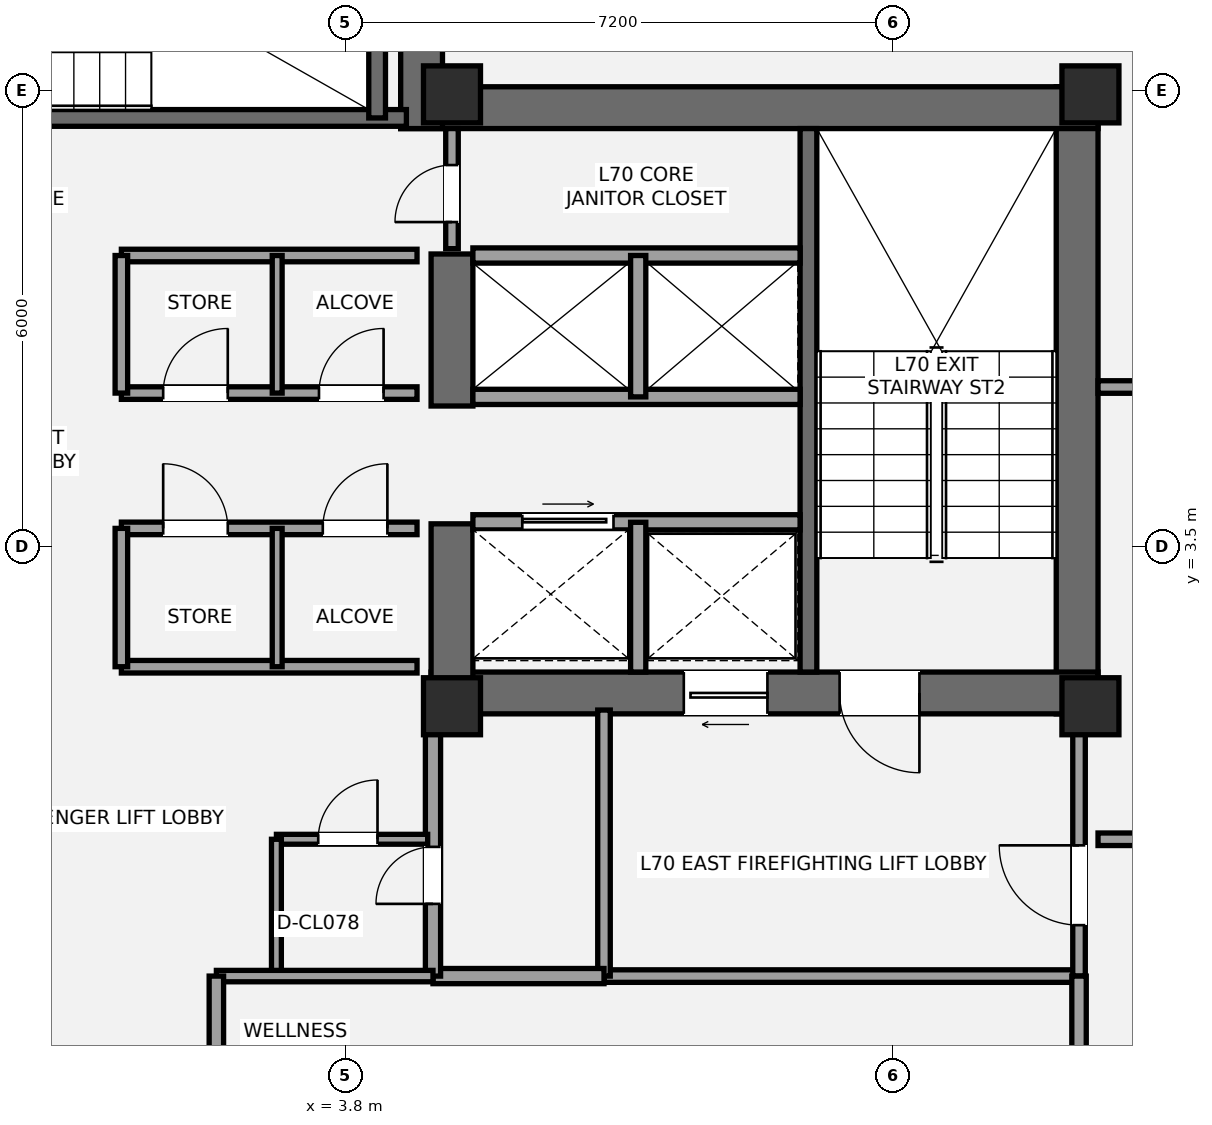
"""IFC4 building model, lengths in metres.
Left out: names, types, materials, properties, quantities, classifications, styles, units other than length and angle.
Written with IfcOpenShell. Run it as: python <this file> out.ifc"""

import sys

from ifc_helpers import new_model, si_unit, direction, frame, frame_2d, origin, origin_2d, place, context, subcontext, project, spatial, rectangle, extrude, element, fill, save


model = new_model("IFC4")
c1 = context("Model", 3, precision=1e-05, world=origin(), true_north=direction((0.0, 1.0)))
c2 = subcontext(c1, "Body", "Model", "MODEL_VIEW")
j1 = project(units=[si_unit("LENGTHUNIT", "METRE"), si_unit("PLANEANGLEUNIT", "RADIAN")], contexts=[c1])
p1 = place(None, origin())
s1 = spatial("IfcSite", under=j1, at=p1, CompositionType="ELEMENT")
p2 = place(p1, origin())
s2 = spatial("IfcBuilding", under=s1, at=p2, CompositionType="ELEMENT")
p3 = place(p2, frame((0.0, 0.0, 247.8)))
s3 = spatial("IfcBuildingStorey", under=s2, at=p3, CompositionType="ELEMENT", Elevation=247.8)
p4 = place(p3, frame((13.425, 1.3, 0.0), z_axis=(0.0, 0.0, 1.0), x_axis=(0.0, 1.0, 0.0)))
e1 = element("IfcWall", 1, at=p4, inside=s3, PredefinedType="SHEAR", context=c2, shape_type="SweptSolid", body=[
    extrude(rectangle(XDim=8.25, YDim=0.55, at=frame_2d((4.125, 0.0))), origin(), (0.0, 0.0, 1.0), 3.15),
])
p5 = place(p3, frame((4.525, 9.275, 0.0), z_axis=(0.0, 0.0, 1.0), x_axis=(1.0, 0.0, 0.0)))
e2 = element("IfcWall", 2, at=p5, inside=s3, PredefinedType="SHEAR", context=c2, shape_type="SweptSolid", body=[
    extrude(rectangle(XDim=9.175, YDim=0.55, at=frame_2d((4.587, 0.0))), origin(), (0.0, 0.0, 1.0), 3.15),
])
p6 = place(p3, frame((13.7, 1.575, 0.0), z_axis=(0.0, 0.0, 1.0), x_axis=(-1.0, 0.0, 0.0)))
e3 = element("IfcWall", 3, at=p6, inside=s3, PredefinedType="SHEAR", context=c2, shape_type="SweptSolid", body=[
    extrude(rectangle(XDim=8.775, YDim=0.55, at=frame_2d((4.387, 0.0))), origin(), (0.0, 0.0, 1.0), 3.15),
])
p7 = place(p6, frame((2.35, 0.0, 0.0)))
e4 = element("IfcOpeningElement", 4, at=p7, cuts=e3, PredefinedType="OPENING", context=c2, shape_type="SweptSolid", body=[
    extrude(rectangle(XDim=1.05, YDim=2.15, at=frame_2d((0.525, 1.075))), frame((0.0, 0.285, 0.0), z_axis=(0.0, -1.0, 0.0), x_axis=(1.0, 0.0, 0.0)), (0.0, 0.0, 1.0), 0.57),
])
p8 = place(p6, frame((4.35, 0.0, 0.0)))
e5 = element("IfcOpeningElement", 5, at=p8, cuts=e3, PredefinedType="OPENING", context=c2, shape_type="SweptSolid", body=[
    extrude(rectangle(XDim=1.1, YDim=2.2, at=frame_2d((0.55, 1.1))), frame((0.0, 0.285, 0.0), z_axis=(0.0, -1.0, 0.0), x_axis=(1.0, 0.0, 0.0)), (0.0, 0.0, 1.0), 0.57),
])
p9 = place(p3, frame((5.2, 1.3, 0.0), z_axis=(0.0, 0.0, 1.0), x_axis=(0.0, 1.0, 0.0)))
e6 = element("IfcWall", 6, at=p9, inside=s3, PredefinedType="SHEAR", context=c2, shape_type="SweptSolid", body=[
    extrude(rectangle(XDim=2.5, YDim=0.55, at=frame_2d((1.25, 0.0))), origin(), (0.0, 0.0, 1.0), 3.15),
])
p10 = place(p3, frame((5.2, 5.35, 0.0), z_axis=(0.0, 0.0, 1.0), x_axis=(0.0, 1.0, 0.0)))
e7 = element("IfcWall", 7, at=p10, inside=s3, PredefinedType="SHEAR", context=c2, shape_type="SweptSolid", body=[
    extrude(rectangle(XDim=2.0, YDim=0.55, at=frame_2d((1.0, 0.0))), origin(), (0.0, 0.0, 1.0), 3.15),
])
p11 = place(p3, frame((9.89, 1.85, 0.0), z_axis=(0.0, 0.0, 1.0), x_axis=(0.0, 1.0, 0.0)))
e8 = element("IfcWall", 8, at=p11, inside=s3, PredefinedType="SHEAR", context=c2, shape_type="SweptSolid", body=[
    extrude(rectangle(XDim=7.15, YDim=0.22, at=frame_2d((3.575, 0.0))), origin(), (0.0, 0.0, 1.0), 3.15),
])
p12 = place(p3, frame((4.8, 9.0, 0.0), z_axis=(0.0, 0.0, 1.0), x_axis=(0.0, 1.0, 0.0)))
e9 = element("IfcWall", 9, at=p12, inside=s3, PredefinedType="SHEAR", context=c2, shape_type="SweptSolid", body=[
    extrude(rectangle(XDim=3.95, YDim=0.55, at=frame_2d((1.975, 0.0))), origin(), (0.0, 0.0, 1.0), 3.15),
])
p13 = place(p3, frame((-4.7, 9.14, 0.0), z_axis=(0.0, 0.0, 1.0), x_axis=(1.0, 0.0, 0.0)))
e10 = element("IfcWall", 10, at=p13, inside=s3, PredefinedType="SHEAR", context=c2, shape_type="SweptSolid", body=[
    extrude(rectangle(XDim=9.3, YDim=0.22, at=frame_2d((4.65, 0.0))), origin(), (0.0, 0.0, 1.0), 3.15),
])
p14 = place(p13, frame((1.15, 0.0, 0.0)))
e11 = element("IfcOpeningElement", 11, at=p14, cuts=e10, PredefinedType="OPENING", context=c2, shape_type="SweptSolid", body=[
    extrude(rectangle(XDim=1.05, YDim=2.15, at=frame_2d((0.525, 1.075))), frame((0.0, 0.12, 0.0), z_axis=(0.0, -1.0, 0.0), x_axis=(1.0, 0.0, 0.0)), (0.0, 0.0, 1.0), 0.24),
])
p15 = place(p3, frame((4.215, 9.14, 0.0), z_axis=(0.0, 0.0, 1.0), x_axis=(0.0, 1.0, 0.0)))
e12 = element("IfcWall", 12, at=p15, inside=s3, PredefinedType="SHEAR", context=c2, shape_type="SweptSolid", body=[
    extrude(rectangle(XDim=3.26, YDim=0.22, at=frame_2d((1.63, 0.0))), origin(), (0.0, 0.0, 1.0), 3.15),
])
for number, where, z_axis, x_axis in (
    (13, (5.2, 1.4, 0.0), (0.0, 0.0, 1.0), (1.0, 0.0, 0.0)),
    (14, (5.2, 9.45, 0.0), (0.0, 0.0, 1.0), (1.0, 0.0, 0.0)),
    (15, (13.6, 1.4, 0.0), (0.0, 0.0, 1.0), (1.0, 0.0, 0.0)),
    (16, (13.6, 9.45, 0.0), (0.0, 0.0, 1.0), (1.0, 0.0, 0.0)),
):
    element("IfcColumn", number, at=place(p3, frame(where, z_axis=z_axis, x_axis=x_axis)), inside=s3, PredefinedType="PILASTER", context=c2, shape_type="SweptSolid", body=[
        extrude(rectangle(XDim=0.75, YDim=0.75, at=origin_2d()), origin(), (0.0, 0.0, 1.0), 3.15),
    ])
p16 = place(p3, frame((7.2, -2.15, 0.0), z_axis=(0.0, 0.0, 1.0), x_axis=(1.0, 0.0, 0.0)))
e17 = element("IfcWall", 17, at=p16, inside=s3, PredefinedType="PARTITIONING", context=c2, shape_type="SweptSolid", body=[
    extrude(rectangle(XDim=6.25, YDim=0.165, at=frame_2d((3.125, 0.0))), origin(), (0.0, 0.0, 1.0), 2.97),
])
p17 = place(p3, frame((7.2, -2.15, 0.0), z_axis=(0.0, 0.0, 1.0), x_axis=(0.0, 1.0, 0.0)))
e18 = element("IfcWall", 18, at=p17, inside=s3, PredefinedType="PARTITIONING", context=c2, shape_type="SweptSolid", body=[
    extrude(rectangle(XDim=3.5, YDim=0.165, at=frame_2d((1.75, 0.0))), origin(), (0.0, 0.0, 1.0), 2.423),
])
p18 = place(p3, frame((13.45, -2.15, 0.0), z_axis=(0.0, 0.0, 1.0), x_axis=(0.0, 1.0, 0.0)))
e19 = element("IfcWall", 19, at=p18, inside=s3, PredefinedType="PARTITIONING", context=c2, shape_type="SweptSolid", body=[
    extrude(rectangle(XDim=3.5, YDim=0.165, at=frame_2d((1.75, 0.0))), origin(), (0.0, 0.0, 1.0), 2.423),
])
p19 = place(p18, frame((0.67, 0.0, 0.0)))
e20 = element("IfcOpeningElement", 20, at=p19, cuts=e19, PredefinedType="OPENING", context=c2, shape_type="SweptSolid", body=[
    extrude(rectangle(XDim=1.05, YDim=2.15, at=frame_2d((0.525, 1.075))), frame((0.0, 0.093, 0.0), z_axis=(0.0, -1.0, 0.0), x_axis=(1.0, 0.0, 0.0)), (0.0, 0.0, 1.0), 0.185),
])
p20 = place(p3, frame((4.95, -2.15, 0.0), z_axis=(0.0, 0.0, 1.0), x_axis=(1.0, 0.0, 0.0)))
e21 = element("IfcWall", 21, at=p20, inside=s3, PredefinedType="SOLIDWALL", context=c2, shape_type="SweptSolid", body=[
    extrude(rectangle(XDim=2.25, YDim=0.2, at=frame_2d((1.125, 0.0))), origin(), (0.0, 0.0, 1.0), 2.97),
])
p21 = place(p3, frame((4.95, -2.15, 0.0), z_axis=(0.0, 0.0, 1.0), x_axis=(0.0, 1.0, 0.0)))
e22 = element("IfcWall", 22, at=p21, inside=s3, PredefinedType="SOLIDWALL", context=c2, shape_type="SweptSolid", body=[
    extrude(rectangle(XDim=3.5, YDim=0.2, at=frame_2d((1.75, 0.0))), origin(), (0.0, 0.0, 1.0), 2.423),
])
p22 = place(p21, frame((0.95, 0.0, 0.0)))
e23 = element("IfcOpeningElement", 23, at=p22, cuts=e22, PredefinedType="OPENING", context=c2, shape_type="SweptSolid", body=[
    extrude(rectangle(XDim=0.75, YDim=2.1, at=frame_2d((0.375, 1.05))), frame((0.0, 0.11, 0.0), z_axis=(0.0, -1.0, 0.0), x_axis=(1.0, 0.0, 0.0)), (0.0, 0.0, 1.0), 0.22),
])
p23 = place(p3, frame((2.89, -0.35, 0.0), z_axis=(0.0, 0.0, 1.0), x_axis=(1.0, 0.0, 0.0)))
e24 = element("IfcWall", 24, at=p23, inside=s3, PredefinedType="PARTITIONING", context=c2, shape_type="SweptSolid", body=[
    extrude(rectangle(XDim=1.99, YDim=0.13, at=frame_2d((0.995, 0.0))), origin(), (0.0, 0.0, 1.0), 2.97),
])
p24 = place(p23, frame((0.55, 0.0, 0.0)))
e25 = element("IfcOpeningElement", 25, at=p24, cuts=e24, PredefinedType="OPENING", context=c2, shape_type="SweptSolid", body=[
    extrude(rectangle(XDim=0.78, YDim=2.1, at=frame_2d((0.39, 1.05))), frame((0.0, 0.075, 0.0), z_axis=(0.0, -1.0, 0.0), x_axis=(1.0, 0.0, 0.0)), (0.0, 0.0, 1.0), 0.15),
])
p25 = place(p3, frame((2.89, -2.15, 0.0), z_axis=(0.0, 0.0, 1.0), x_axis=(0.0, 1.0, 0.0)))
e26 = element("IfcWall", 26, at=p25, inside=s3, PredefinedType="PARTITIONING", context=c2, shape_type="SweptSolid", body=[
    extrude(rectangle(XDim=1.8, YDim=0.13, at=frame_2d((0.9, 0.0))), origin(), (0.0, 0.0, 1.0), 2.97),
])
p26 = place(p3, frame((5.475, 3.82, 0.0), z_axis=(0.0, 0.0, 1.0), x_axis=(1.0, 0.0, 0.0)))
e27 = element("IfcWall", 27, at=p26, inside=s3, PredefinedType="SOLIDWALL", context=c2, shape_type="SweptSolid", body=[
    extrude(rectangle(XDim=4.305, YDim=0.2, at=frame_2d((2.152, 0.0))), origin(), (0.0, 0.0, 1.0), 2.97),
])
p27 = place(p26, frame((0.65, 0.0, 0.0)))
e28 = element("IfcOpeningElement", 28, at=p27, cuts=e27, PredefinedType="OPENING", context=c2, shape_type="SweptSolid", body=[
    extrude(rectangle(XDim=1.2, YDim=2.2, at=frame_2d((0.6, 1.1))), frame((0.0, 0.11, 0.0), z_axis=(0.0, -1.0, 0.0), x_axis=(1.0, 0.0, 0.0)), (0.0, 0.0, 1.0), 0.22),
])
p28 = place(p3, frame((7.65, 1.85, 0.0), z_axis=(0.0, 0.0, 1.0), x_axis=(0.0, 1.0, 0.0)))
e29 = element("IfcWall", 29, at=p28, inside=s3, PredefinedType="SOLIDWALL", context=c2, shape_type="SweptSolid", body=[
    extrude(rectangle(XDim=1.97, YDim=0.2, at=frame_2d((0.985, 0.0))), origin(), (0.0, 0.0, 1.0), 2.97),
])
for number, where, z_axis, x_axis in (
    (30, (5.475, 5.47, 0.0), (0.0, 0.0, 1.0), (1.0, 0.0, 0.0)),
    (31, (5.475, 7.33, 0.0), (0.0, 0.0, 1.0), (1.0, 0.0, 0.0)),
):
    element("IfcWall", number, at=place(p3, frame(where, z_axis=z_axis, x_axis=x_axis)), inside=s3, PredefinedType="SOLIDWALL", context=c2, shape_type="SweptSolid", body=[
        extrude(rectangle(XDim=4.305, YDim=0.2, at=frame_2d((2.152, 0.0))), origin(), (0.0, 0.0, 1.0), 2.97),
    ])
p29 = place(p3, frame((7.65, 5.47, 0.0), z_axis=(0.0, 0.0, 1.0), x_axis=(0.0, 1.0, 0.0)))
e32 = element("IfcWall", 32, at=p29, inside=s3, PredefinedType="SOLIDWALL", context=c2, shape_type="SweptSolid", body=[
    extrude(rectangle(XDim=1.86, YDim=0.2, at=frame_2d((0.93, 0.0))), origin(), (0.0, 0.0, 1.0), 2.97),
])
p30 = place(p3, frame((0.85, 1.92, 0.0), z_axis=(0.0, 0.0, 1.0), x_axis=(1.0, 0.0, 0.0)))
e33 = element("IfcWall", 33, at=p30, inside=s3, PredefinedType="PARTITIONING", context=c2, shape_type="SweptSolid", body=[
    extrude(rectangle(XDim=3.89, YDim=0.165, at=frame_2d((1.945, 0.0))), origin(), (0.0, 0.0, 1.0), 2.11),
])
p31 = place(p3, frame((0.85, 3.74, 0.0), z_axis=(0.0, 0.0, 1.0), x_axis=(1.0, 0.0, 0.0)))
e34 = element("IfcWall", 34, at=p31, inside=s3, PredefinedType="PARTITIONING", context=c2, shape_type="SweptSolid", body=[
    extrude(rectangle(XDim=3.89, YDim=0.165, at=frame_2d((1.945, 0.0))), origin(), (0.0, 0.0, 1.0), 2.97),
])
p32 = place(p31, frame((0.55, 0.0, 0.0)))
e35 = element("IfcOpeningElement", 35, at=p32, cuts=e34, PredefinedType="OPENING", context=c2, shape_type="SweptSolid", body=[
    extrude(rectangle(XDim=0.85, YDim=2.1, at=frame_2d((0.425, 1.05))), frame((0.0, 0.093, 0.0), z_axis=(0.0, -1.0, 0.0), x_axis=(1.0, 0.0, 0.0)), (0.0, 0.0, 1.0), 0.185),
])
p33 = place(p31, frame((2.65, 0.0, 0.0)))
e36 = element("IfcOpeningElement", 36, at=p33, cuts=e34, PredefinedType="OPENING", context=c2, shape_type="SweptSolid", body=[
    extrude(rectangle(XDim=0.85, YDim=2.1, at=frame_2d((0.425, 1.05))), frame((0.0, 0.093, 0.0), z_axis=(0.0, -1.0, 0.0), x_axis=(1.0, 0.0, 0.0)), (0.0, 0.0, 1.0), 0.185),
])
p34 = place(p3, frame((0.85, 1.92, 0.0), z_axis=(0.0, 0.0, 1.0), x_axis=(0.0, 1.0, 0.0)))
e37 = element("IfcWall", 37, at=p34, inside=s3, PredefinedType="PARTITIONING", context=c2, shape_type="SweptSolid", body=[
    extrude(rectangle(XDim=1.82, YDim=0.165, at=frame_2d((0.91, 0.0))), origin(), (0.0, 0.0, 1.0), 2.97),
])
p35 = place(p3, frame((2.9, 1.92, 0.0), z_axis=(0.0, 0.0, 1.0), x_axis=(0.0, 1.0, 0.0)))
e38 = element("IfcWall", 38, at=p35, inside=s3, PredefinedType="PARTITIONING", context=c2, shape_type="SweptSolid", body=[
    extrude(rectangle(XDim=1.82, YDim=0.13, at=frame_2d((0.91, 0.0))), origin(), (0.0, 0.0, 1.0), 2.97),
])
p36 = place(p3, frame((0.85, 5.52, 0.0), z_axis=(0.0, 0.0, 1.0), x_axis=(1.0, 0.0, 0.0)))
e39 = element("IfcWall", 39, at=p36, inside=s3, PredefinedType="PARTITIONING", context=c2, shape_type="SweptSolid", body=[
    extrude(rectangle(XDim=3.89, YDim=0.165, at=frame_2d((1.945, 0.0))), origin(), (0.0, 0.0, 1.0), 2.97),
])
p37 = place(p36, frame((0.55, 0.0, 0.0)))
e40 = element("IfcOpeningElement", 40, at=p37, cuts=e39, PredefinedType="OPENING", context=c2, shape_type="SweptSolid", body=[
    extrude(rectangle(XDim=0.85, YDim=2.1, at=frame_2d((0.425, 1.05))), frame((0.0, 0.093, 0.0), z_axis=(0.0, -1.0, 0.0), x_axis=(1.0, 0.0, 0.0)), (0.0, 0.0, 1.0), 0.185),
])
p38 = place(p36, frame((2.6, 0.0, 0.0)))
e41 = element("IfcOpeningElement", 41, at=p38, cuts=e39, PredefinedType="OPENING", context=c2, shape_type="SweptSolid", body=[
    extrude(rectangle(XDim=0.85, YDim=2.1, at=frame_2d((0.425, 1.05))), frame((0.0, 0.093, 0.0), z_axis=(0.0, -1.0, 0.0), x_axis=(1.0, 0.0, 0.0)), (0.0, 0.0, 1.0), 0.185),
])
p39 = place(p3, frame((0.85, 7.33, 0.0), z_axis=(0.0, 0.0, 1.0), x_axis=(1.0, 0.0, 0.0)))
e42 = element("IfcWall", 42, at=p39, inside=s3, PredefinedType="PARTITIONING", context=c2, shape_type="SweptSolid", body=[
    extrude(rectangle(XDim=3.89, YDim=0.165, at=frame_2d((1.945, 0.0))), origin(), (0.0, 0.0, 1.0), 2.97),
])
p40 = place(p3, frame((0.85, 5.52, 0.0), z_axis=(0.0, 0.0, 1.0), x_axis=(0.0, 1.0, 0.0)))
e43 = element("IfcWall", 43, at=p40, inside=s3, PredefinedType="PARTITIONING", context=c2, shape_type="SweptSolid", body=[
    extrude(rectangle(XDim=1.81, YDim=0.165, at=frame_2d((0.905, 0.0))), origin(), (0.0, 0.0, 1.0), 2.97),
])
p41 = place(p3, frame((2.9, 5.52, 0.0), z_axis=(0.0, 0.0, 1.0), x_axis=(0.0, 1.0, 0.0)))
e44 = element("IfcWall", 44, at=p41, inside=s3, PredefinedType="PARTITIONING", context=c2, shape_type="SweptSolid", body=[
    extrude(rectangle(XDim=1.81, YDim=0.13, at=frame_2d((0.905, 0.0))), origin(), (0.0, 0.0, 1.0), 2.97),
])
p42 = place(p3, frame((5.2, 7.42, 0.0), z_axis=(0.0, 0.0, 1.0), x_axis=(0.0, 1.0, 0.0)))
e45 = element("IfcWall", 45, at=p42, inside=s3, PredefinedType="PARTITIONING", context=c2, shape_type="SweptSolid", body=[
    extrude(rectangle(XDim=1.58, YDim=0.165, at=frame_2d((0.79, 0.0))), origin(), (0.0, 0.0, 1.0), 2.97),
])
p43 = place(p42, frame((0.35, 0.0, 0.0)))
e46 = element("IfcOpeningElement", 46, at=p43, cuts=e45, PredefinedType="OPENING", context=c2, shape_type="SweptSolid", body=[
    extrude(rectangle(XDim=0.75, YDim=2.1, at=frame_2d((0.375, 1.05))), frame((0.0, 0.093, 0.0), z_axis=(0.0, -1.0, 0.0), x_axis=(1.0, 0.0, 0.0)), (0.0, 0.0, 1.0), 0.185),
])
p44 = place(p3, frame((2.1, -2.15, 0.0), z_axis=(0.0, 0.0, 1.0), x_axis=(1.0, 0.0, 0.0)))
e47 = element("IfcWall", 47, at=p44, inside=s3, PredefinedType="PLUMBINGWALL", context=c2, shape_type="SweptSolid", body=[
    extrude(rectangle(XDim=2.85, YDim=0.15, at=frame_2d((1.425, 0.0))), origin(), (0.0, 0.0, 1.0), 2.97),
])
p45 = place(p3, frame((2.1, -4.05, 0.0), z_axis=(0.0, 0.0, 1.0), x_axis=(0.0, 1.0, 0.0)))
e48 = element("IfcWall", 48, at=p45, inside=s3, PredefinedType="PLUMBINGWALL", context=c2, shape_type="SweptSolid", body=[
    extrude(rectangle(XDim=1.9, YDim=0.19, at=frame_2d((0.95, 0.0))), origin(), (0.0, 0.0, 1.0), 2.97),
])
p46 = place(p3, frame((13.45, -4.05, 0.0), z_axis=(0.0, 0.0, 1.0), x_axis=(0.0, 1.0, 0.0)))
e49 = element("IfcWall", 49, at=p46, inside=s3, PredefinedType="PLUMBINGWALL", context=c2, shape_type="SweptSolid", body=[
    extrude(rectangle(XDim=1.9, YDim=0.19, at=frame_2d((0.95, 0.0))), origin(), (0.0, 0.0, 1.0), 2.423),
])
p47 = place(p3, frame((13.7, -0.35, 0.0), z_axis=(0.0, 0.0, 1.0), x_axis=(1.0, 0.0, 0.0)))
e50 = element("IfcWall", 50, at=p47, inside=s3, PredefinedType="PARTITIONING", context=c2, shape_type="SweptSolid", body=[
    extrude(rectangle(XDim=2.5, YDim=0.165, at=frame_2d((1.25, 0.0))), origin(), (0.0, 0.0, 1.0), 2.423),
])
p48 = place(p3, frame((13.7, 5.6, 0.0), z_axis=(0.0, 0.0, 1.0), x_axis=(1.0, 0.0, 0.0)))
e51 = element("IfcWall", 51, at=p48, inside=s3, PredefinedType="PARTITIONING", context=c2, shape_type="SweptSolid", body=[
    extrude(rectangle(XDim=6.115, YDim=0.165, at=frame_2d((3.058, 0.0))), origin(), (0.0, 0.0, 1.0), 2.423),
])
p49 = place(p48, frame((2.961, 0.0, 0.0)))
e52 = element("IfcOpeningElement", 52, at=p49, cuts=e51, PredefinedType="OPENING", context=c2, shape_type="SweptSolid", body=[
    extrude(rectangle(XDim=0.9, YDim=2.1, at=frame_2d((0.45, 1.05))), frame((0.0, 0.093, 0.0), z_axis=(0.0, -1.0, 0.0), x_axis=(1.0, 0.0, 0.0)), (0.0, 0.0, 1.0), 0.185),
])
p50 = place(p7, origin())
e53 = element("IfcDoor", 53, at=p50, inside=s3, OperationType="SINGLE_SWING_LEFT", PredefinedType="DOOR", context=c2, shape_type="SweptSolid", body=[
    extrude(rectangle(XDim=1.05, YDim=2.15, at=frame_2d((0.525, 1.075))), frame((0.0, 0.025, 0.0), z_axis=(0.0, -1.0, 0.0), x_axis=(1.0, 0.0, 0.0)), (0.0, 0.0, 1.0), 0.05),
])
fill(e4, e53)
p51 = place(p19, origin())
e54 = element("IfcDoor", 54, at=p51, inside=s3, OperationType="SINGLE_SWING_RIGHT", PredefinedType="DOOR", context=c2, shape_type="SweptSolid", body=[
    extrude(rectangle(XDim=1.05, YDim=2.15, at=frame_2d((0.525, 1.075))), frame((0.0, 0.025, 0.0), z_axis=(0.0, -1.0, 0.0), x_axis=(1.0, 0.0, 0.0)), (0.0, 0.0, 1.0), 0.05),
])
fill(e20, e54)
p52 = place(p22, origin())
e55 = element("IfcDoor", 55, at=p52, inside=s3, OperationType="SINGLE_SWING_LEFT", PredefinedType="DOOR", context=c2, shape_type="SweptSolid", body=[
    extrude(rectangle(XDim=0.75, YDim=2.1, at=frame_2d((0.375, 1.05))), frame((0.0, 0.025, 0.0), z_axis=(0.0, -1.0, 0.0), x_axis=(1.0, 0.0, 0.0)), (0.0, 0.0, 1.0), 0.05),
])
fill(e23, e55)
p53 = place(p24, origin())
e56 = element("IfcDoor", 56, at=p53, inside=s3, OperationType="SINGLE_SWING_RIGHT", PredefinedType="DOOR", context=c2, shape_type="SweptSolid", body=[
    extrude(rectangle(XDim=0.78, YDim=2.1, at=frame_2d((0.39, 1.05))), frame((0.0, 0.025, 0.0), z_axis=(0.0, -1.0, 0.0), x_axis=(1.0, 0.0, 0.0)), (0.0, 0.0, 1.0), 0.05),
])
fill(e25, e56)
p54 = place(p8, origin())
e57 = element("IfcDoor", 57, at=p54, inside=s3, OperationType="SLIDING_TO_LEFT", PredefinedType="DOOR", context=c2, shape_type="SweptSolid", body=[
    extrude(rectangle(XDim=1.1, YDim=2.2, at=frame_2d((0.55, 1.1))), frame((0.0, 0.025, 0.0), z_axis=(0.0, -1.0, 0.0), x_axis=(1.0, 0.0, 0.0)), (0.0, 0.0, 1.0), 0.05),
])
fill(e5, e57)
p55 = place(p27, origin())
e58 = element("IfcDoor", 58, at=p55, inside=s3, OperationType="SLIDING_TO_RIGHT", PredefinedType="DOOR", context=c2, shape_type="SweptSolid", body=[
    extrude(rectangle(XDim=1.2, YDim=2.2, at=frame_2d((0.6, 1.1))), frame((0.0, 0.025, 0.0), z_axis=(0.0, -1.0, 0.0), x_axis=(1.0, 0.0, 0.0)), (0.0, 0.0, 1.0), 0.05),
])
fill(e28, e58)
p56 = place(p32, origin())
e59 = element("IfcDoor", 59, at=p56, inside=s3, OperationType="SINGLE_SWING_LEFT", PredefinedType="DOOR", context=c2, shape_type="SweptSolid", body=[
    extrude(rectangle(XDim=0.85, YDim=2.1, at=frame_2d((0.425, 1.05))), frame((0.0, 0.025, 0.0), z_axis=(0.0, -1.0, 0.0), x_axis=(1.0, 0.0, 0.0)), (0.0, 0.0, 1.0), 0.05),
])
fill(e35, e59)
p57 = place(p33, origin())
e60 = element("IfcDoor", 60, at=p57, inside=s3, OperationType="SINGLE_SWING_RIGHT", PredefinedType="DOOR", context=c2, shape_type="SweptSolid", body=[
    extrude(rectangle(XDim=0.85, YDim=2.1, at=frame_2d((0.425, 1.05))), frame((0.0, 0.025, 0.0), z_axis=(0.0, -1.0, 0.0), x_axis=(1.0, 0.0, 0.0)), (0.0, 0.0, 1.0), 0.05),
])
fill(e36, e60)
p58 = place(p37, origin())
e61 = element("IfcDoor", 61, at=p58, inside=s3, OperationType="SINGLE_SWING_RIGHT", PredefinedType="DOOR", context=c2, shape_type="SweptSolid", body=[
    extrude(rectangle(XDim=0.85, YDim=2.1, at=frame_2d((0.425, 1.05))), frame((0.0, 0.025, 0.0), z_axis=(0.0, -1.0, 0.0), x_axis=(1.0, 0.0, 0.0)), (0.0, 0.0, 1.0), 0.05),
])
fill(e40, e61)
p59 = place(p38, origin())
e62 = element("IfcDoor", 62, at=p59, inside=s3, OperationType="SINGLE_SWING_RIGHT", PredefinedType="DOOR", context=c2, shape_type="SweptSolid", body=[
    extrude(rectangle(XDim=0.85, YDim=2.1, at=frame_2d((0.425, 1.05))), frame((0.0, 0.025, 0.0), z_axis=(0.0, -1.0, 0.0), x_axis=(1.0, 0.0, 0.0)), (0.0, 0.0, 1.0), 0.05),
])
fill(e41, e62)
p60 = place(p43, origin())
e63 = element("IfcDoor", 63, at=p60, inside=s3, OperationType="SINGLE_SWING_LEFT", PredefinedType="DOOR", context=c2, shape_type="SweptSolid", body=[
    extrude(rectangle(XDim=0.75, YDim=2.1, at=frame_2d((0.375, 1.05))), frame((0.0, 0.025, 0.0), z_axis=(0.0, -1.0, 0.0), x_axis=(1.0, 0.0, 0.0)), (0.0, 0.0, 1.0), 0.05),
])
fill(e46, e63)
save(model, sys.argv[1])
